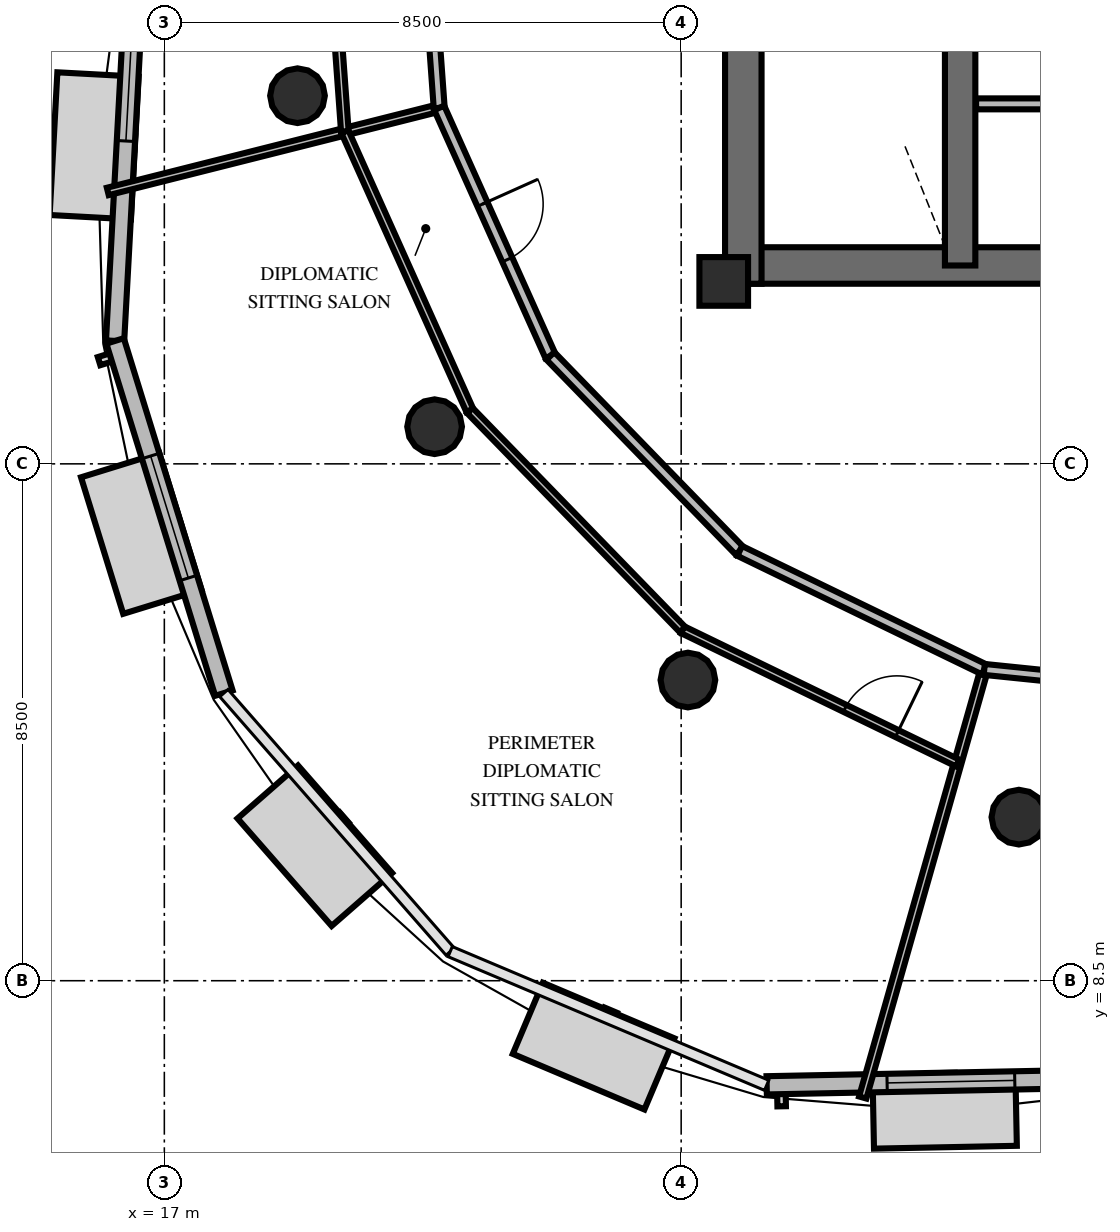
"""IFC4 building model, lengths in metres.
Left out: names, types, materials, properties, quantities, classifications, styles, units other than length and angle.
Written with IfcOpenShell. Run it as: python <this file> out.ifc"""

import sys

from ifc_helpers import new_model, si_unit, direction, frame, frame_2d, origin, origin_2d, place, context, subcontext, project, spatial, rectangle, circle, extrude, element, fill, save


model = new_model("IFC4")
c1 = context("Model", 3, precision=1e-05, world=origin(), true_north=direction((0.0, 1.0)))
c2 = subcontext(c1, "Body", "Model", "MODEL_VIEW")
j1 = project(units=[si_unit("LENGTHUNIT", "METRE"), si_unit("PLANEANGLEUNIT", "RADIAN")], contexts=[c1])
p1 = place(None, origin())
s1 = spatial("IfcSite", under=j1, at=p1, CompositionType="ELEMENT")
p2 = place(p1, origin())
s2 = spatial("IfcBuilding", under=s1, at=p2, CompositionType="ELEMENT")
p3 = place(p2, frame((0.0, 0.0, 255.6)))
s3 = spatial("IfcBuildingStorey", under=s2, at=p3, CompositionType="ELEMENT", Elevation=255.6)
p4 = place(p3, frame((26.222, 20.262, 0.0), z_axis=(0.0, 0.0, 1.0), x_axis=(1.0, 0.0, 0.0)))
e1 = element("IfcWall", 1, at=p4, inside=s3, PredefinedType="SHEAR", context=c2, shape_type="SweptSolid", body=[
    extrude(rectangle(XDim=15.566, YDim=0.6, at=frame_2d((7.783, 0.0))), origin(), (0.0, 0.0, 1.0), 3.6),
])
p5 = place(p3, frame((26.522, 19.962, 0.0), z_axis=(0.0, 0.0, 1.0), x_axis=(0.0, 1.0, 0.0)))
e2 = element("IfcWall", 2, at=p5, inside=s3, PredefinedType="SHEAR", context=c2, shape_type="SweptSolid", body=[
    extrude(rectangle(XDim=10.276, YDim=0.6, at=frame_2d((5.138, 0.0))), origin(), (0.0, 0.0, 1.0), 3.6),
])
p6 = place(p3, frame((30.088, 20.262, 0.0), z_axis=(0.0, 0.0, 1.0), x_axis=(0.0, 1.0, 0.0)))
e3 = element("IfcWall", 3, at=p6, inside=s3, PredefinedType="SHEAR", context=c2, shape_type="SweptSolid", body=[
    extrude(rectangle(XDim=9.676, YDim=0.5, at=frame_2d((4.838, 0.0))), origin(), (0.0, 0.0, 1.0), 3.6),
])
p7 = place(p3, frame((26.2, 20.0, 0.0), z_axis=(0.0, 0.0, 1.0), x_axis=(1.0, 0.0, 0.0)))
e4 = element("IfcColumn", 4, at=p7, inside=s3, PredefinedType="PILASTER", context=c2, shape_type="SweptSolid", body=[
    extrude(rectangle(XDim=0.8, YDim=0.8, at=origin_2d()), origin(), (0.0, 0.0, 1.0), 3.6),
])
for number, where, z_axis, x_axis in (
    (5, (19.19, 23.054, 0.0), (0.0, 0.0, 1.0), (1.0, 0.0, 0.0)),
    (6, (21.445, 17.611, 0.0), (0.0, 0.0, 1.0), (1.0, 0.0, 0.0)),
    (7, (25.611, 13.445, 0.0), (0.0, 0.0, 1.0), (1.0, 0.0, 0.0)),
    (8, (31.054, 11.19, 0.0), (0.0, 0.0, 1.0), (1.0, 0.0, 0.0)),
):
    element("IfcColumn", number, at=place(p3, frame(where, z_axis=z_axis, x_axis=x_axis)), inside=s3, PredefinedType="COLUMN", context=c2, shape_type="SweptSolid", body=[
        extrude(circle(Radius=0.45, at=origin_2d()), origin(), (0.0, 0.0, 1.0), 3.6),
    ])
p8 = place(p3, frame((16.549, 25.655, 0.0), z_axis=(0.0, 0.0, 1.0), x_axis=(-0.054024777516, -0.998539595316, 0.0)))
e9 = element("IfcWall", 9, at=p8, inside=s3, PredefinedType="SOLIDWALL", context=c2, shape_type="SweptSolid", body=[
    extrude(rectangle(XDim=6.643, YDim=0.3, at=frame_2d((3.322, 0.0))), origin(), (0.0, 0.0, 1.0), 2.76),
])
p9 = place(p8, frame((1.251, 0.0, 0.8)))
e10 = element("IfcOpeningElement", 10, at=p9, cuts=e9, PredefinedType="OPENING", context=c2, shape_type="SweptSolid", body=[
    extrude(rectangle(XDim=2.1, YDim=1.85, at=frame_2d((1.05, 0.925))), frame((0.0, 0.16, 0.0), z_axis=(0.0, -1.0, 0.0), x_axis=(1.0, 0.0, 0.0)), (0.0, 0.0, 1.0), 0.32),
])
p10 = place(p3, frame((16.19, 19.022, 0.0), z_axis=(0.0, 0.0, 1.0), x_axis=(0.295175258965, -0.955443125725, 0.0)))
e11 = element("IfcWall", 11, at=p10, inside=s3, PredefinedType="SOLIDWALL", context=c2, shape_type="SweptSolid", body=[
    extrude(rectangle(XDim=6.062, YDim=0.3, at=frame_2d((3.031, 0.0))), origin(), (0.0, 0.0, 1.0), 2.76),
])
p11 = place(p10, frame((1.981, 0.0, 0.8)))
e12 = element("IfcOpeningElement", 12, at=p11, cuts=e11, PredefinedType="OPENING", context=c2, shape_type="SweptSolid", body=[
    extrude(rectangle(XDim=2.1, YDim=1.85, at=frame_2d((1.05, 0.925))), frame((0.0, 0.16, 0.0), z_axis=(0.0, -1.0, 0.0), x_axis=(1.0, 0.0, 0.0)), (0.0, 0.0, 1.0), 0.32),
])
p12 = place(p3, frame((26.906, 6.78, 0.0), z_axis=(0.0, 0.0, 1.0), x_axis=(0.999804463841, 0.019774581742, 0.0)))
e13 = element("IfcWall", 13, at=p12, inside=s3, PredefinedType="SOLIDWALL", context=c2, shape_type="SweptSolid", body=[
    extrude(rectangle(XDim=6.062, YDim=0.3, at=frame_2d((3.031, 0.0))), origin(), (0.0, 0.0, 1.0), 2.76),
])
p13 = place(p12, frame((1.981, 0.0, 0.8)))
e14 = element("IfcOpeningElement", 14, at=p13, cuts=e13, PredefinedType="OPENING", context=c2, shape_type="SweptSolid", body=[
    extrude(rectangle(XDim=2.1, YDim=1.85, at=frame_2d((1.05, 0.925))), frame((0.0, 0.16, 0.0), z_axis=(0.0, -1.0, 0.0), x_axis=(1.0, 0.0, 0.0)), (0.0, 0.0, 1.0), 0.32),
])
p14 = place(p3, frame((30.35, 22.92, 0.0), z_axis=(0.0, 0.0, 1.0), x_axis=(1.0, 0.0, 0.0)))
e15 = element("IfcWall", 15, at=p14, inside=s3, PredefinedType="PARTITIONING", context=c2, shape_type="SweptSolid", body=[
    extrude(rectangle(XDim=7.3, YDim=0.18, at=frame_2d((3.65, 0.0))), origin(), (0.0, 0.0, 1.0), 2.46),
])
p15 = place(p14, frame((3.15, 0.0, 0.0)))
e16 = element("IfcOpeningElement", 16, at=p15, cuts=e15, PredefinedType="OPENING", context=c2, shape_type="SweptSolid", body=[
    extrude(rectangle(XDim=1.0, YDim=2.15, at=frame_2d((0.5, 1.075))), frame((0.0, 0.1, 0.0), z_axis=(0.0, -1.0, 0.0), x_axis=(1.0, 0.0, 0.0)), (0.0, 0.0, 1.0), 0.2),
])
p16 = place(p3, frame((21.521, 22.854, 0.0), z_axis=(0.0, 0.0, 1.0), x_axis=(-0.969655144504, -0.24447678977, 0.0)))
e17 = element("IfcWall", 17, at=p16, inside=s3, PredefinedType="PARTITIONING", context=c2, shape_type="SweptSolid", body=[
    extrude(rectangle(XDim=5.621, YDim=0.125, at=frame_2d((2.811, 0.0))), origin(), (0.0, 0.0, 1.0), 2.46),
])
p17 = place(p3, frame((21.197, 27.312, 0.0), z_axis=(0.0, 0.0, 1.0), x_axis=(0.072372694258, -0.997377658225, 0.0)))
e18 = element("IfcWall", 18, at=p17, inside=s3, PredefinedType="PARTITIONING", context=c2, shape_type="SweptSolid", body=[
    extrude(rectangle(XDim=4.47, YDim=0.18, at=frame_2d((2.235, 0.0))), origin(), (0.0, 0.0, 1.0), 2.46),
])
p18 = place(p17, frame((0.942, 0.0, 0.0)))
e19 = element("IfcOpeningElement", 19, at=p18, cuts=e18, PredefinedType="OPENING", context=c2, shape_type="SweptSolid", body=[
    extrude(rectangle(XDim=1.0, YDim=2.15, at=frame_2d((0.5, 1.075))), frame((0.0, 0.1, 0.0), z_axis=(0.0, -1.0, 0.0), x_axis=(1.0, 0.0, 0.0)), (0.0, 0.0, 1.0), 0.2),
])
p19 = place(p3, frame((19.605, 27.475, 0.0), z_axis=(0.0, 0.0, 1.0), x_axis=(0.07233799713, -0.997380175345, 0.0)))
e20 = element("IfcWall", 20, at=p19, inside=s3, PredefinedType="PARTITIONING", context=c2, shape_type="SweptSolid", body=[
    extrude(rectangle(XDim=5.025, YDim=0.125, at=frame_2d((2.513, 0.0))), origin(), (0.0, 0.0, 1.0), 2.46),
])
p20 = place(p19, frame((1.109, 0.0, 0.0)))
e21 = element("IfcOpeningElement", 21, at=p20, cuts=e20, PredefinedType="OPENING", context=c2, shape_type="SweptSolid", body=[
    extrude(rectangle(XDim=0.95, YDim=2.15, at=frame_2d((0.475, 1.075))), frame((0.0, 0.073, 0.0), z_axis=(0.0, -1.0, 0.0), x_axis=(1.0, 0.0, 0.0)), (0.0, 0.0, 1.0), 0.145),
])
p21 = place(p3, frame((30.485, 13.619, 0.0), z_axis=(0.0, 0.0, 1.0), x_axis=(-0.273121338455, -0.961979591509, 0.0)))
e22 = element("IfcWall", 22, at=p21, inside=s3, PredefinedType="PARTITIONING", context=c2, shape_type="SweptSolid", body=[
    extrude(rectangle(XDim=7.318, YDim=0.125, at=frame_2d((3.659, 0.0))), origin(), (0.0, 0.0, 1.0), 2.46),
])
p22 = place(p3, frame((21.521, 22.854, 0.0), z_axis=(0.0, 0.0, 1.0), x_axis=(0.409126480148, -0.912477683695, 0.0)))
e23 = element("IfcWall", 23, at=p22, inside=s3, PredefinedType="PARTITIONING", context=c2, shape_type="SweptSolid", body=[
    extrude(rectangle(XDim=4.469, YDim=0.18, at=frame_2d((2.235, 0.0))), origin(), (0.0, 0.0, 1.0), 2.46),
])
p23 = place(p22, frame((1.735, 0.0, 0.0)))
e24 = element("IfcOpeningElement", 24, at=p23, cuts=e23, PredefinedType="OPENING", context=c2, shape_type="SweptSolid", body=[
    extrude(rectangle(XDim=1.0, YDim=2.15, at=frame_2d((0.5, 1.075))), frame((0.0, 0.1, 0.0), z_axis=(0.0, -1.0, 0.0), x_axis=(1.0, 0.0, 0.0)), (0.0, 0.0, 1.0), 0.2),
])
for number, where, z_axis, x_axis in (
    (25, (23.349, 18.775, 0.0), (0.0, 0.0, 1.0), (0.697, -0.718, 0.0)),
    (26, (26.462, 15.568, 0.0), (0.0, 0.0, 1.0), (0.9, -0.436, 0.0)),
):
    element("IfcWall", number, at=place(p3, frame(where, z_axis=z_axis, x_axis=x_axis)), inside=s3, PredefinedType="PARTITIONING", context=c2, shape_type="SweptSolid", body=[
        extrude(rectangle(XDim=4.47, YDim=0.18, at=frame_2d((2.235, 0.0))), origin(), (0.0, 0.0, 1.0), 2.46),
    ])
for number, where, z_axis, x_axis in (
    (27, (19.969, 22.463, 0.0), (0.0, 0.0, 1.0), (0.409, -0.912, 0.0)),
    (28, (22.025, 17.877, 0.0), (0.0, 0.0, 1.0), (0.697, -0.718, 0.0)),
):
    element("IfcWall", number, at=place(p3, frame(where, z_axis=z_axis, x_axis=x_axis)), inside=s3, PredefinedType="PARTITIONING", context=c2, shape_type="SweptSolid", body=[
        extrude(rectangle(XDim=5.025, YDim=0.125, at=frame_2d((2.513, 0.0))), origin(), (0.0, 0.0, 1.0), 2.46),
    ])
p24 = place(p3, frame((25.525, 14.271, 0.0), z_axis=(0.0, 0.0, 1.0), x_axis=(0.899944095425, -0.436005303992, 0.0)))
e29 = element("IfcWall", 29, at=p24, inside=s3, PredefinedType="PARTITIONING", context=c2, shape_type="SweptSolid", body=[
    extrude(rectangle(XDim=5.026, YDim=0.125, at=frame_2d((2.513, 0.0))), origin(), (0.0, 0.0, 1.0), 2.46),
])
p25 = place(p24, frame((2.967, 0.0, 0.0)))
e30 = element("IfcOpeningElement", 30, at=p25, cuts=e29, PredefinedType="OPENING", context=c2, shape_type="SweptSolid", body=[
    extrude(rectangle(XDim=0.95, YDim=2.15, at=frame_2d((0.475, 1.075))), frame((0.0, 0.073, 0.0), z_axis=(0.0, -1.0, 0.0), x_axis=(1.0, 0.0, 0.0)), (0.0, 0.0, 1.0), 0.145),
])
p26 = place(p3, frame((30.485, 13.619, 0.0), z_axis=(0.0, 0.0, 1.0), x_axis=(0.994792520189, -0.10192076224, 0.0)))
e31 = element("IfcWall", 31, at=p26, inside=s3, PredefinedType="PARTITIONING", context=c2, shape_type="SweptSolid", body=[
    extrude(rectangle(XDim=4.47, YDim=0.18, at=frame_2d((2.235, 0.0))), origin(), (0.0, 0.0, 1.0), 2.46),
])
p27 = place(p9, origin())
e32 = element("IfcWindow", 32, at=p27, inside=s3, PartitioningType="SINGLE_PANEL", PredefinedType="WINDOW", context=c2, shape_type="SweptSolid", body=[
    extrude(rectangle(XDim=2.1, YDim=1.85, at=frame_2d((1.05, 0.925))), frame((0.0, 0.03, 0.0), z_axis=(0.0, -1.0, 0.0), x_axis=(1.0, 0.0, 0.0)), (0.0, 0.0, 1.0), 0.06),
])
fill(e10, e32)
p28 = place(p11, origin())
e33 = element("IfcWindow", 33, at=p28, inside=s3, PartitioningType="SINGLE_PANEL", PredefinedType="WINDOW", context=c2, shape_type="SweptSolid", body=[
    extrude(rectangle(XDim=2.1, YDim=1.85, at=frame_2d((1.05, 0.925))), frame((0.0, 0.03, 0.0), z_axis=(0.0, -1.0, 0.0), x_axis=(1.0, 0.0, 0.0)), (0.0, 0.0, 1.0), 0.06),
])
fill(e12, e33)
p29 = place(p13, origin())
e34 = element("IfcWindow", 34, at=p29, inside=s3, PartitioningType="SINGLE_PANEL", PredefinedType="WINDOW", context=c2, shape_type="SweptSolid", body=[
    extrude(rectangle(XDim=2.1, YDim=1.85, at=frame_2d((1.05, 0.925))), frame((0.0, 0.03, 0.0), z_axis=(0.0, -1.0, 0.0), x_axis=(1.0, 0.0, 0.0)), (0.0, 0.0, 1.0), 0.06),
])
fill(e14, e34)
p30 = place(p23, origin())
e35 = element("IfcDoor", 35, at=p30, inside=s3, OperationType="SINGLE_SWING_LEFT", PredefinedType="DOOR", context=c2, shape_type="SweptSolid", body=[
    extrude(rectangle(XDim=1.0, YDim=2.15, at=frame_2d((0.5, 1.075))), frame((0.0, 0.025, 0.0), z_axis=(0.0, -1.0, 0.0), x_axis=(1.0, 0.0, 0.0)), (0.0, 0.0, 1.0), 0.05),
])
fill(e24, e35)
p31 = place(p25, origin())
e36 = element("IfcDoor", 36, at=p31, inside=s3, OperationType="SINGLE_SWING_RIGHT", PredefinedType="DOOR", context=c2, shape_type="SweptSolid", body=[
    extrude(rectangle(XDim=0.95, YDim=2.15, at=frame_2d((0.475, 1.075))), frame((0.0, 0.025, 0.0), z_axis=(0.0, -1.0, 0.0), x_axis=(1.0, 0.0, 0.0)), (0.0, 0.0, 1.0), 0.05),
])
fill(e30, e36)
save(model, sys.argv[1])
